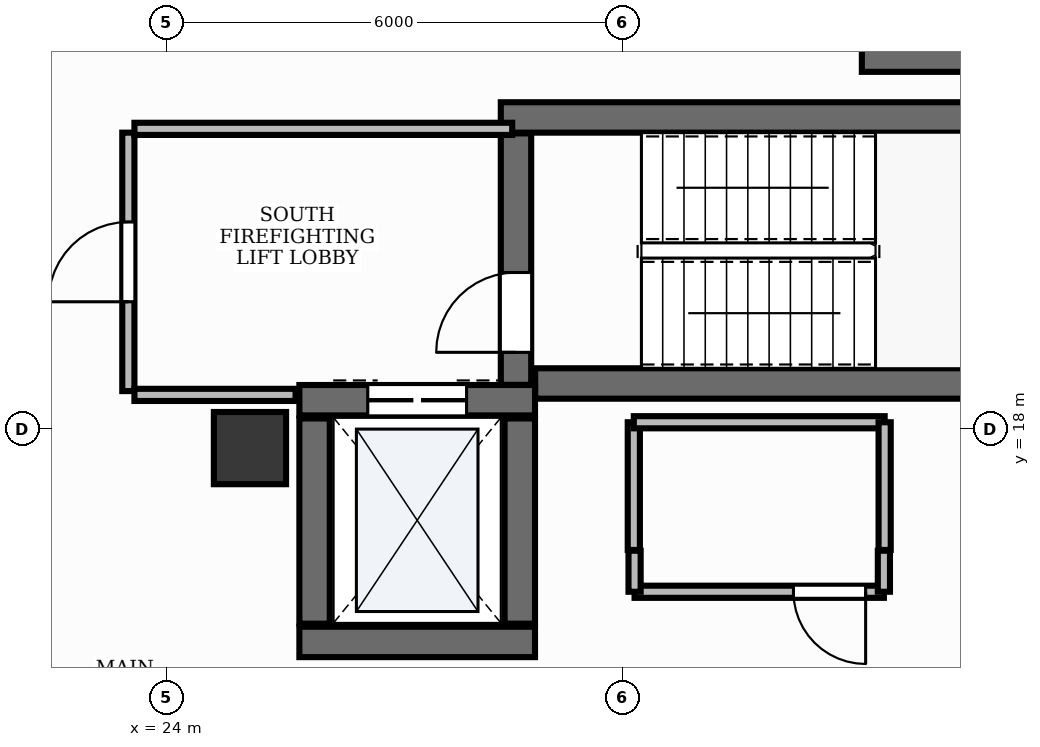
"""IFC4 building model, lengths in metres.
Left out: names, types, materials, properties, quantities, classifications, styles, units other than length and angle.
Written with IfcOpenShell. Run it as: python <this file> out.ifc"""

import sys

from ifc_helpers import new_model, si_unit, direction, frame, frame_2d, origin, origin_2d, place, context, subcontext, project, spatial, rectangle, extrude, element, fill, save


model = new_model("IFC4")
c1 = context("Model", 3, precision=1e-05, world=origin(), true_north=direction((0.0, 1.0)))
c2 = subcontext(c1, "Body", "Model", "MODEL_VIEW")
j1 = project(units=[si_unit("LENGTHUNIT", "METRE"), si_unit("PLANEANGLEUNIT", "RADIAN")], contexts=[c1])
p1 = place(None, origin())
s1 = spatial("IfcSite", under=j1, at=p1, CompositionType="ELEMENT")
p2 = place(p1, origin())
s2 = spatial("IfcBuilding", under=s1, at=p2, CompositionType="ELEMENT")
p3 = place(p2, frame((0.0, 0.0, 166.8)))
s3 = spatial("IfcBuildingStorey", under=s2, at=p3, CompositionType="ELEMENT", Elevation=166.8)
p4 = place(p3, frame((28.852, 18.6, 0.0), z_axis=(0.0, 0.0, 1.0), x_axis=(1.0, 0.0, 0.0)))
e1 = element("IfcWall", 1, at=p4, inside=s3, PredefinedType="SHEAR", context=c2, shape_type="SweptSolid", body=[
    extrude(rectangle(XDim=8.198, YDim=0.4, at=frame_2d((4.099, 0.0))), origin(), (0.0, 0.0, 1.0), 3.9),
])
p5 = place(p3, frame((28.4, 22.1, 0.0), z_axis=(0.0, 0.0, 1.0), x_axis=(1.0, 0.0, 0.0)))
e2 = element("IfcWall", 2, at=p5, inside=s3, PredefinedType="SHEAR", context=c2, shape_type="SweptSolid", body=[
    extrude(rectangle(XDim=8.65, YDim=0.4, at=frame_2d((4.325, 0.0))), origin(), (0.0, 0.0, 1.0), 3.9),
])
p6 = place(p3, frame((28.6, 18.582, 0.0), z_axis=(0.0, 0.0, 1.0), x_axis=(0.0, 1.0, 0.0)))
e3 = element("IfcWall", 3, at=p6, inside=s3, PredefinedType="SHEAR", context=c2, shape_type="SweptSolid", body=[
    extrude(rectangle(XDim=3.308, YDim=0.4, at=frame_2d((1.654, 0.0))), origin(), (0.0, 0.0, 1.0), 3.9),
])
p7 = place(p6, frame((0.428, 0.0, 0.0)))
e4 = element("IfcOpeningElement", 4, at=p7, cuts=e3, PredefinedType="OPENING", context=c2, shape_type="SweptSolid", body=[
    extrude(rectangle(XDim=1.05, YDim=2.15, at=frame_2d((0.525, 1.075))), frame((0.0, 0.215, 0.0), z_axis=(0.0, -1.0, 0.0), x_axis=(1.0, 0.0, 0.0)), (0.0, 0.0, 1.0), 0.43),
])
p8 = place(p3, frame((33.15, 22.9, 0.0), z_axis=(0.0, 0.0, 1.0), x_axis=(1.0, 0.0, 0.0)))
e5 = element("IfcWall", 5, at=p8, inside=s3, PredefinedType="SHEAR", context=c2, shape_type="SweptSolid", body=[
    extrude(rectangle(XDim=3.9, YDim=0.4, at=frame_2d((1.95, 0.0))), origin(), (0.0, 0.0, 1.0), 3.9),
])
p9 = place(p3, frame((25.75, 15.2, 0.0), z_axis=(0.0, 0.0, 1.0), x_axis=(1.0, 0.0, 0.0)))
e6 = element("IfcWall", 6, at=p9, inside=s3, PredefinedType="SHEAR", context=c2, shape_type="SweptSolid", body=[
    extrude(rectangle(XDim=3.1, YDim=0.4, at=frame_2d((1.55, 0.0))), origin(), (0.0, 0.0, 1.0), 3.9),
])
p10 = place(p3, frame((25.75, 18.38, 0.0), z_axis=(0.0, 0.0, 1.0), x_axis=(1.0, 0.0, 0.0)))
e7 = element("IfcWall", 7, at=p10, inside=s3, PredefinedType="SHEAR", context=c2, shape_type="SweptSolid", body=[
    extrude(rectangle(XDim=3.1, YDim=0.4, at=frame_2d((1.55, 0.0))), origin(), (0.0, 0.0, 1.0), 3.9),
])
p11 = place(p10, frame((0.9, 0.0, 0.0)))
e8 = element("IfcOpeningElement", 8, at=p11, cuts=e7, PredefinedType="OPENING", context=c2, shape_type="SweptSolid", body=[
    extrude(rectangle(XDim=1.3, YDim=2.2, at=frame_2d((0.65, 1.1))), frame((0.0, 0.215, 0.0), z_axis=(0.0, -1.0, 0.0), x_axis=(1.0, 0.0, 0.0)), (0.0, 0.0, 1.0), 0.43),
])
for number, where, z_axis, x_axis in (
    (9, (25.95, 15.44, 0.0), (0.0, 0.0, 1.0), (0.0, 1.0, 0.0)),
    (10, (28.65, 15.44, 0.0), (0.0, 0.0, 1.0), (0.0, 1.0, 0.0)),
):
    element("IfcWall", number, at=place(p3, frame(where, z_axis=z_axis, x_axis=x_axis)), inside=s3, PredefinedType="SHEAR", context=c2, shape_type="SweptSolid", body=[
        extrude(rectangle(XDim=2.7, YDim=0.4, at=frame_2d((1.35, 0.0))), origin(), (0.0, 0.0, 1.0), 3.9),
    ])
p12 = place(p3, frame((25.1, 17.75, -0.0), z_axis=(0.0, 0.0, 1.0), x_axis=(1.0, 0.0, 0.0)))
e11 = element("IfcColumn", 11, at=p12, inside=s3, PredefinedType="PILASTER", context=c2, shape_type="SweptSolid", body=[
    extrude(rectangle(XDim=0.95, YDim=0.95, at=origin_2d()), origin(), (0.0, 0.0, 1.0), 3.901),
])
p13 = place(p3, frame((23.5, 18.5, 0.0), z_axis=(0.0, 0.0, 1.0), x_axis=(0.0, 1.0, 0.0)))
e12 = element("IfcWall", 12, at=p13, inside=s3, PredefinedType="PARTITIONING", context=c2, shape_type="SweptSolid", body=[
    extrude(rectangle(XDim=3.4, YDim=0.16, at=frame_2d((1.7, 0.0))), origin(), (0.0, 0.0, 1.0), 2.91),
])
p14 = place(p13, frame((1.175, 0.0, 0.0)))
e13 = element("IfcOpeningElement", 13, at=p14, cuts=e12, PredefinedType="OPENING", context=c2, shape_type="SweptSolid", body=[
    extrude(rectangle(XDim=1.05, YDim=2.15, at=frame_2d((0.525, 1.075))), frame((0.0, 0.095, 0.0), z_axis=(0.0, -1.0, 0.0), x_axis=(1.0, 0.0, 0.0)), (0.0, 0.0, 1.0), 0.19),
])
p15 = place(p3, frame((23.58, 21.95, 0.0), z_axis=(0.0, 0.0, 1.0), x_axis=(1.0, 0.0, 0.0)))
e14 = element("IfcWall", 14, at=p15, inside=s3, PredefinedType="PARTITIONING", context=c2, shape_type="SweptSolid", body=[
    extrude(rectangle(XDim=4.97, YDim=0.16, at=frame_2d((2.485, 0.0))), origin(), (0.0, 0.0, 1.0), 2.91),
])
p16 = place(p3, frame((23.58, 18.45, 0.0), z_axis=(0.0, 0.0, 1.0), x_axis=(1.0, 0.0, 0.0)))
e15 = element("IfcWall", 15, at=p16, inside=s3, PredefinedType="PARTITIONING", context=c2, shape_type="SweptSolid", body=[
    extrude(rectangle(XDim=2.12, YDim=0.16, at=frame_2d((1.06, 0.0))), origin(), (0.0, 0.0, 1.0), 2.91),
])
p17 = place(p3, frame((33.44, 15.86, 0.0), z_axis=(0.0, 0.0, 1.0), x_axis=(-1.0, 0.0, 0.0)))
e16 = element("IfcWall", 16, at=p17, inside=s3, PredefinedType="PARTITIONING", context=c2, shape_type="SweptSolid", body=[
    extrude(rectangle(XDim=3.28, YDim=0.16, at=frame_2d((1.64, 0.0))), origin(), (0.0, 0.0, 1.0), 2.91),
])
p18 = place(p17, frame((0.24, 0.0, 0.0)))
e17 = element("IfcOpeningElement", 17, at=p18, cuts=e16, PredefinedType="OPENING", context=c2, shape_type="SweptSolid", body=[
    extrude(rectangle(XDim=0.95, YDim=2.15, at=frame_2d((0.475, 1.075))), frame((0.0, 0.095, 0.0), z_axis=(0.0, -1.0, 0.0), x_axis=(1.0, 0.0, 0.0)), (0.0, 0.0, 1.0), 0.19),
])
for number, where, z_axis, x_axis in (
    (18, (33.44, 16.4, 0.0), (0.0, 0.0, 1.0), (0.0, -1.0, 0.0)),
    (19, (30.16, 15.86, 0.0), (0.0, 0.0, 1.0), (0.0, 1.0, 0.0)),
):
    element("IfcWall", number, at=place(p3, frame(where, z_axis=z_axis, x_axis=x_axis)), inside=s3, PredefinedType="PARTITIONING", context=c2, shape_type="SweptSolid", body=[
        extrude(rectangle(XDim=0.54, YDim=0.16, at=frame_2d((0.27, 0.0))), origin(), (0.0, 0.0, 1.0), 2.91),
    ])
p19 = place(p3, frame((30.15, 16.41, 0.0), z_axis=(0.0, 0.0, 1.0), x_axis=(0.0, 1.0, 0.0)))
e20 = element("IfcWall", 20, at=p19, inside=s3, PredefinedType="PARTITIONING", context=c2, shape_type="SweptSolid", body=[
    extrude(rectangle(XDim=1.68, YDim=0.16, at=frame_2d((0.84, 0.0))), origin(), (0.0, 0.0, 1.0), 2.91),
])
p20 = place(p3, frame((30.15, 18.09, 0.0), z_axis=(0.0, 0.0, 1.0), x_axis=(1.0, 0.0, 0.0)))
e21 = element("IfcWall", 21, at=p20, inside=s3, PredefinedType="PARTITIONING", context=c2, shape_type="SweptSolid", body=[
    extrude(rectangle(XDim=3.3, YDim=0.16, at=frame_2d((1.65, 0.0))), origin(), (0.0, 0.0, 1.0), 2.91),
])
p21 = place(p3, frame((33.45, 18.09, 0.0), z_axis=(0.0, 0.0, 1.0), x_axis=(0.0, -1.0, 0.0)))
e22 = element("IfcWall", 22, at=p21, inside=s3, PredefinedType="PARTITIONING", context=c2, shape_type="SweptSolid", body=[
    extrude(rectangle(XDim=1.68, YDim=0.16, at=frame_2d((0.84, 0.0))), origin(), (0.0, 0.0, 1.0), 2.91),
])
p22 = place(p7, origin())
e23 = element("IfcDoor", 23, at=p22, inside=s3, OperationType="SINGLE_SWING_LEFT", PredefinedType="DOOR", context=c2, shape_type="SweptSolid", body=[
    extrude(rectangle(XDim=1.05, YDim=2.15, at=frame_2d((0.525, 1.075))), frame((0.0, 0.025, 0.0), z_axis=(0.0, -1.0, 0.0), x_axis=(1.0, 0.0, 0.0)), (0.0, 0.0, 1.0), 0.05),
])
fill(e4, e23)
p23 = place(p11, origin())
e24 = element("IfcDoor", 24, at=p23, inside=s3, OperationType="DOUBLE_DOOR_SLIDING", PredefinedType="DOOR", context=c2, shape_type="SweptSolid", body=[
    extrude(rectangle(XDim=1.3, YDim=2.2, at=frame_2d((0.65, 1.1))), frame((0.0, 0.025, 0.0), z_axis=(0.0, -1.0, 0.0), x_axis=(1.0, 0.0, 0.0)), (0.0, 0.0, 1.0), 0.05),
])
fill(e8, e24)
p24 = place(p14, origin())
e25 = element("IfcDoor", 25, at=p24, inside=s3, OperationType="SINGLE_SWING_LEFT", PredefinedType="DOOR", context=c2, shape_type="SweptSolid", body=[
    extrude(rectangle(XDim=1.05, YDim=2.15, at=frame_2d((0.525, 1.075))), frame((0.0, 0.025, 0.0), z_axis=(0.0, -1.0, 0.0), x_axis=(1.0, 0.0, 0.0)), (0.0, 0.0, 1.0), 0.05),
])
fill(e13, e25)
p25 = place(p18, origin())
e26 = element("IfcDoor", 26, at=p25, inside=s3, OperationType="SINGLE_SWING_LEFT", PredefinedType="DOOR", context=c2, shape_type="SweptSolid", body=[
    extrude(rectangle(XDim=0.95, YDim=2.15, at=frame_2d((0.475, 1.075))), frame((0.0, 0.025, 0.0), z_axis=(0.0, -1.0, 0.0), x_axis=(1.0, 0.0, 0.0)), (0.0, 0.0, 1.0), 0.05),
])
fill(e17, e26)
save(model, sys.argv[1])
